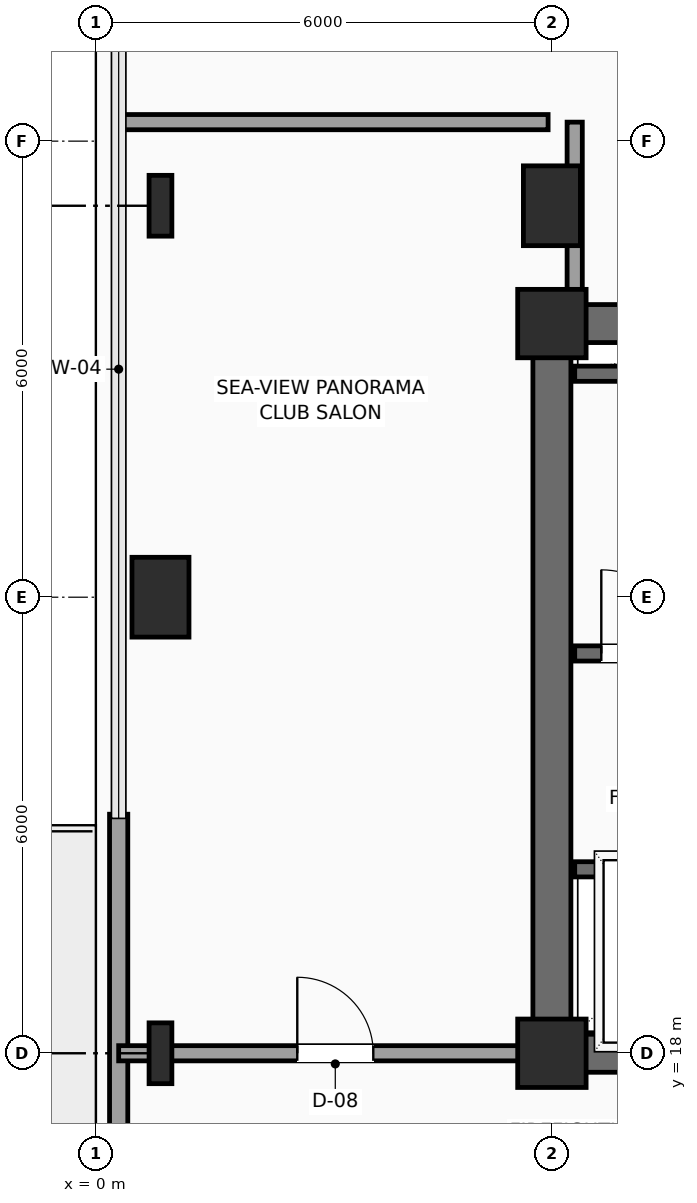
"""IFC4 building model, lengths in metres.
Left out: names, types, materials, properties, quantities, classifications, styles, units other than length and angle.
Written with IfcOpenShell. Run it as: python <this file> out.ifc"""

import sys

from ifc_helpers import new_model, si_unit, direction, frame, frame_2d, origin, origin_2d, place, context, subcontext, project, spatial, rectangle, i_section, extrude, element, fill, save


model = new_model("IFC4")
c1 = context("Model", 3, precision=1e-05, world=origin(), true_north=direction((0.0, 1.0)))
c2 = subcontext(c1, "Body", "Model", "MODEL_VIEW")
j1 = project(units=[si_unit("LENGTHUNIT", "METRE"), si_unit("PLANEANGLEUNIT", "RADIAN")], contexts=[c1])
p1 = place(None, origin())
s1 = spatial("IfcSite", under=j1, at=p1, CompositionType="ELEMENT")
p2 = place(p1, origin())
s2 = spatial("IfcBuilding", under=s1, at=p2, CompositionType="ELEMENT")
p3 = place(p2, frame((0.0, 0.0, 172.95)))
s3 = spatial("IfcBuildingStorey", under=s2, at=p3, CompositionType="ELEMENT", Elevation=172.95)
for number, where, z_axis, x_axis in (
    (1, (6.0, 18.0, 0.0), (0.0, 0.0, 1.0), (1.0, 0.0, 0.0)),
    (2, (6.0, 27.6, 0.0), (0.0, 0.0, 1.0), (1.0, 0.0, 0.0)),
):
    element("IfcColumn", number, at=place(p3, frame(where, z_axis=z_axis, x_axis=x_axis)), inside=s3, PredefinedType="COLUMN", context=c2, shape_type="SweptSolid", body=[
        extrude(rectangle(XDim=0.9, YDim=0.9, at=origin_2d()), origin(), (0.0, 0.0, 1.0), 3.75),
    ])
p4 = place(p3, frame((0.85, 18.0, 0.0), z_axis=(0.0, 0.0, 1.0), x_axis=(1.0, 0.0, 0.0)))
e3 = element("IfcColumn", 3, at=p4, inside=s3, PredefinedType="COLUMN", context=c2, shape_type="SweptSolid", body=[
    extrude(i_section(OverallWidth=0.3, OverallDepth=0.8, WebThickness=0.018, FlangeThickness=0.033, FilletRadius=0.03, at=origin_2d()), origin(), (0.0, 0.0, 1.0), 3.75),
])
p5 = place(p3, frame((0.85, 24.0, 0.0), z_axis=(0.0, 0.0, 1.0), x_axis=(1.0, 0.0, 0.0)))
e4 = element("IfcColumn", 4, at=p5, inside=s3, PredefinedType="COLUMN", context=c2, shape_type="SweptSolid", body=[
    extrude(rectangle(XDim=0.75, YDim=1.05, at=origin_2d()), origin(), (0.0, 0.0, 1.0), 3.75),
])
p6 = place(p3, frame((0.85, 29.15, 0.0), z_axis=(0.0, 0.0, 1.0), x_axis=(1.0, 0.0, 0.0)))
e5 = element("IfcColumn", 5, at=p6, inside=s3, PredefinedType="COLUMN", context=c2, shape_type="SweptSolid", body=[
    extrude(i_section(OverallWidth=0.3, OverallDepth=0.8, WebThickness=0.018, FlangeThickness=0.033, FilletRadius=0.03, at=origin_2d()), origin(), (0.0, 0.0, 1.0), 3.75),
])
p7 = place(p3, frame((6.0, 29.15, 0.0), z_axis=(0.0, 0.0, 1.0), x_axis=(1.0, 0.0, 0.0)))
e6 = element("IfcColumn", 6, at=p7, inside=s3, PredefinedType="COLUMN", context=c2, shape_type="SweptSolid", body=[
    extrude(rectangle(XDim=0.75, YDim=1.05, at=origin_2d()), origin(), (0.0, 0.0, 1.0), 3.75),
])
p8 = place(p3, frame((0.3, 11.855, 0.0), z_axis=(0.0, 0.0, 1.0), x_axis=(0.0, 1.0, 0.0)))
e7 = element("IfcWall", 7, at=p8, inside=s3, PredefinedType="SOLIDWALL", context=c2, shape_type="SweptSolid", body=[
    extrude(rectangle(XDim=9.29, YDim=0.24, at=frame_2d((4.645, 0.0))), origin(), (0.0, 0.0, 1.0), 3.54),
])
p9 = place(p8, frame((2.7, 0.0, 0.0)))
e8 = element("IfcOpeningElement", 8, at=p9, cuts=e7, PredefinedType="OPENING", context=c2, shape_type="SweptSolid", body=[
    extrude(rectangle(XDim=1.05, YDim=2.2, at=frame_2d((0.525, 1.1))), frame((0.0, 0.13, 0.0), z_axis=(0.0, -1.0, 0.0), x_axis=(1.0, 0.0, 0.0)), (0.0, 0.0, 1.0), 0.26),
])
p10 = place(p3, frame((6.0, 18.0, 0.0), z_axis=(0.0, 0.0, 1.0), x_axis=(1.0, 0.0, 0.0)))
e9 = element("IfcWall", 9, at=p10, inside=s3, PredefinedType="SHEAR", context=c2, shape_type="SweptSolid", body=[
    extrude(rectangle(XDim=12.0, YDim=0.5, at=frame_2d((6.0, 0.0))), origin(), (0.0, 0.0, 1.0), 3.54),
])
p11 = place(p10, frame((7.15, 0.0, 0.0)))
e10 = element("IfcOpeningElement", 10, at=p11, cuts=e9, PredefinedType="OPENING", context=c2, shape_type="SweptSolid", body=[
    extrude(rectangle(XDim=1.6, YDim=2.3, at=frame_2d((0.8, 1.15))), frame((0.0, 0.26, 0.0), z_axis=(0.0, -1.0, 0.0), x_axis=(1.0, 0.0, 0.0)), (0.0, 0.0, 1.0), 0.52),
])
p12 = place(p3, frame((6.0, 27.6, 0.0), z_axis=(0.0, 0.0, 1.0), x_axis=(1.0, 0.0, 0.0)))
e11 = element("IfcWall", 11, at=p12, inside=s3, PredefinedType="SHEAR", context=c2, shape_type="SweptSolid", body=[
    extrude(rectangle(XDim=12.0, YDim=0.5, at=frame_2d((6.0, 0.0))), origin(), (0.0, 0.0, 1.0), 3.54),
])
p13 = place(p12, frame((10.2, 0.0, 0.0)))
e12 = element("IfcOpeningElement", 12, at=p13, cuts=e11, PredefinedType="OPENING", context=c2, shape_type="SweptSolid", body=[
    extrude(rectangle(XDim=0.9, YDim=2.15, at=frame_2d((0.45, 1.075))), frame((0.0, 0.26, 0.0), z_axis=(0.0, -1.0, 0.0), x_axis=(1.0, 0.0, 0.0)), (0.0, 0.0, 1.0), 0.52),
])
p14 = place(p3, frame((6.0, 18.0, 0.0), z_axis=(0.0, 0.0, 1.0), x_axis=(0.0, 1.0, 0.0)))
e13 = element("IfcWall", 13, at=p14, inside=s3, PredefinedType="SHEAR", context=c2, shape_type="SweptSolid", body=[
    extrude(rectangle(XDim=9.6, YDim=0.5, at=frame_2d((4.8, 0.0))), origin(), (0.0, 0.0, 1.0), 3.54),
])
p15 = place(p3, frame((6.3, 23.26, 0.0), z_axis=(0.0, 0.0, 1.0), x_axis=(1.0, 0.0, 0.0)))
e14 = element("IfcWall", 14, at=p15, inside=s3, PredefinedType="SHEAR", context=c2, shape_type="SweptSolid", body=[
    extrude(rectangle(XDim=8.88, YDim=0.2, at=frame_2d((4.44, 0.0))), origin(), (0.0, 0.0, 1.0), 3.54),
])
p16 = place(p15, frame((0.35, 0.0, 0.0)))
e15 = element("IfcOpeningElement", 15, at=p16, cuts=e14, PredefinedType="OPENING", context=c2, shape_type="SweptSolid", body=[
    extrude(rectangle(XDim=1.1, YDim=2.2, at=frame_2d((0.55, 1.1))), frame((0.0, 0.11, 0.0), z_axis=(0.0, -1.0, 0.0), x_axis=(1.0, 0.0, 0.0)), (0.0, 0.0, 1.0), 0.22),
])
p17 = place(p3, frame((6.3, 26.94, 0.0), z_axis=(0.0, 0.0, 1.0), x_axis=(1.0, 0.0, 0.0)))
e16 = element("IfcWall", 16, at=p17, inside=s3, PredefinedType="SHEAR", context=c2, shape_type="SweptSolid", body=[
    extrude(rectangle(XDim=8.88, YDim=0.2, at=frame_2d((4.44, 0.0))), origin(), (0.0, 0.0, 1.0), 3.54),
])
p18 = place(p3, frame((6.3, 20.42, 0.0), z_axis=(0.0, 0.0, 1.0), x_axis=(1.0, 0.0, 0.0)))
e17 = element("IfcWall", 17, at=p18, inside=s3, PredefinedType="SHEAR", context=c2, shape_type="SweptSolid", body=[
    extrude(rectangle(XDim=4.95, YDim=0.2, at=frame_2d((2.475, 0.0))), origin(), (0.0, 0.0, 1.0), 3.54),
])
p19 = place(p18, frame((0.65, 0.0, 0.0)))
e18 = element("IfcOpeningElement", 18, at=p19, cuts=e17, PredefinedType="OPENING", context=c2, shape_type="SweptSolid", body=[
    extrude(rectangle(XDim=1.1, YDim=2.2, at=frame_2d((0.55, 1.1))), frame((0.0, 0.11, 0.0), z_axis=(0.0, -1.0, 0.0), x_axis=(1.0, 0.0, 0.0)), (0.0, 0.0, 1.0), 0.22),
])
p20 = place(p18, frame((3.05, 0.0, 0.0)))
e19 = element("IfcOpeningElement", 19, at=p20, cuts=e17, PredefinedType="OPENING", context=c2, shape_type="SweptSolid", body=[
    extrude(rectangle(XDim=1.1, YDim=2.2, at=frame_2d((0.55, 1.1))), frame((0.0, 0.11, 0.0), z_axis=(0.0, -1.0, 0.0), x_axis=(1.0, 0.0, 0.0)), (0.0, 0.0, 1.0), 0.22),
])
p21 = place(p3, frame((0.3, 18.0, 0.0), z_axis=(0.0, 0.0, 1.0), x_axis=(1.0, 0.0, 0.0)))
e20 = element("IfcWall", 20, at=p21, inside=s3, PredefinedType="PARTITIONING", context=c2, shape_type="SweptSolid", body=[
    extrude(rectangle(XDim=5.65, YDim=0.2, at=frame_2d((2.825, 0.0))), origin(), (0.0, 0.0, 1.0), 3.132),
])
p22 = place(p21, frame((2.35, 0.0, 0.0)))
e21 = element("IfcOpeningElement", 21, at=p22, cuts=e20, PredefinedType="OPENING", context=c2, shape_type="SweptSolid", body=[
    extrude(rectangle(XDim=1.0, YDim=2.2, at=frame_2d((0.5, 1.1))), frame((0.0, 0.11, 0.0), z_axis=(0.0, -1.0, 0.0), x_axis=(1.0, 0.0, 0.0)), (0.0, 0.0, 1.0), 0.22),
])
p23 = place(p3, frame((0.3, 30.25, 0.0), z_axis=(0.0, 0.0, 1.0), x_axis=(1.0, 0.0, 0.0)))
e22 = element("IfcWall", 22, at=p23, inside=s3, PredefinedType="PARTITIONING", context=c2, shape_type="SweptSolid", body=[
    extrude(rectangle(XDim=5.65, YDim=0.2, at=frame_2d((2.825, 0.0))), origin(), (0.0, 0.0, 1.0), 3.54),
])
p24 = place(p3, frame((6.3, 27.65, 0.0), z_axis=(0.0, 0.0, 1.0), x_axis=(0.0, 1.0, 0.0)))
e23 = element("IfcWall", 23, at=p24, inside=s3, PredefinedType="PARTITIONING", context=c2, shape_type="SweptSolid", body=[
    extrude(rectangle(XDim=2.6, YDim=0.2, at=frame_2d((1.3, 0.0))), origin(), (0.0, 0.0, 1.0), 3.132),
])
p25 = place(p16, origin())
e24 = element("IfcDoor", 24, at=p25, inside=s3, OperationType="SINGLE_SWING_LEFT", PredefinedType="DOOR", context=c2, shape_type="SweptSolid", body=[
    extrude(rectangle(XDim=1.1, YDim=2.2, at=frame_2d((0.55, 1.1))), frame((0.0, 0.025, 0.0), z_axis=(0.0, -1.0, 0.0), x_axis=(1.0, 0.0, 0.0)), (0.0, 0.0, 1.0), 0.05),
])
fill(e15, e24)
p26 = place(p22, origin())
e25 = element("IfcDoor", 25, at=p26, inside=s3, OperationType="SINGLE_SWING_LEFT", PredefinedType="DOOR", context=c2, shape_type="SweptSolid", body=[
    extrude(rectangle(XDim=1.0, YDim=2.2, at=frame_2d((0.5, 1.1))), frame((0.0, 0.025, 0.0), z_axis=(0.0, -1.0, 0.0), x_axis=(1.0, 0.0, 0.0)), (0.0, 0.0, 1.0), 0.05),
])
fill(e21, e25)
save(model, sys.argv[1])
